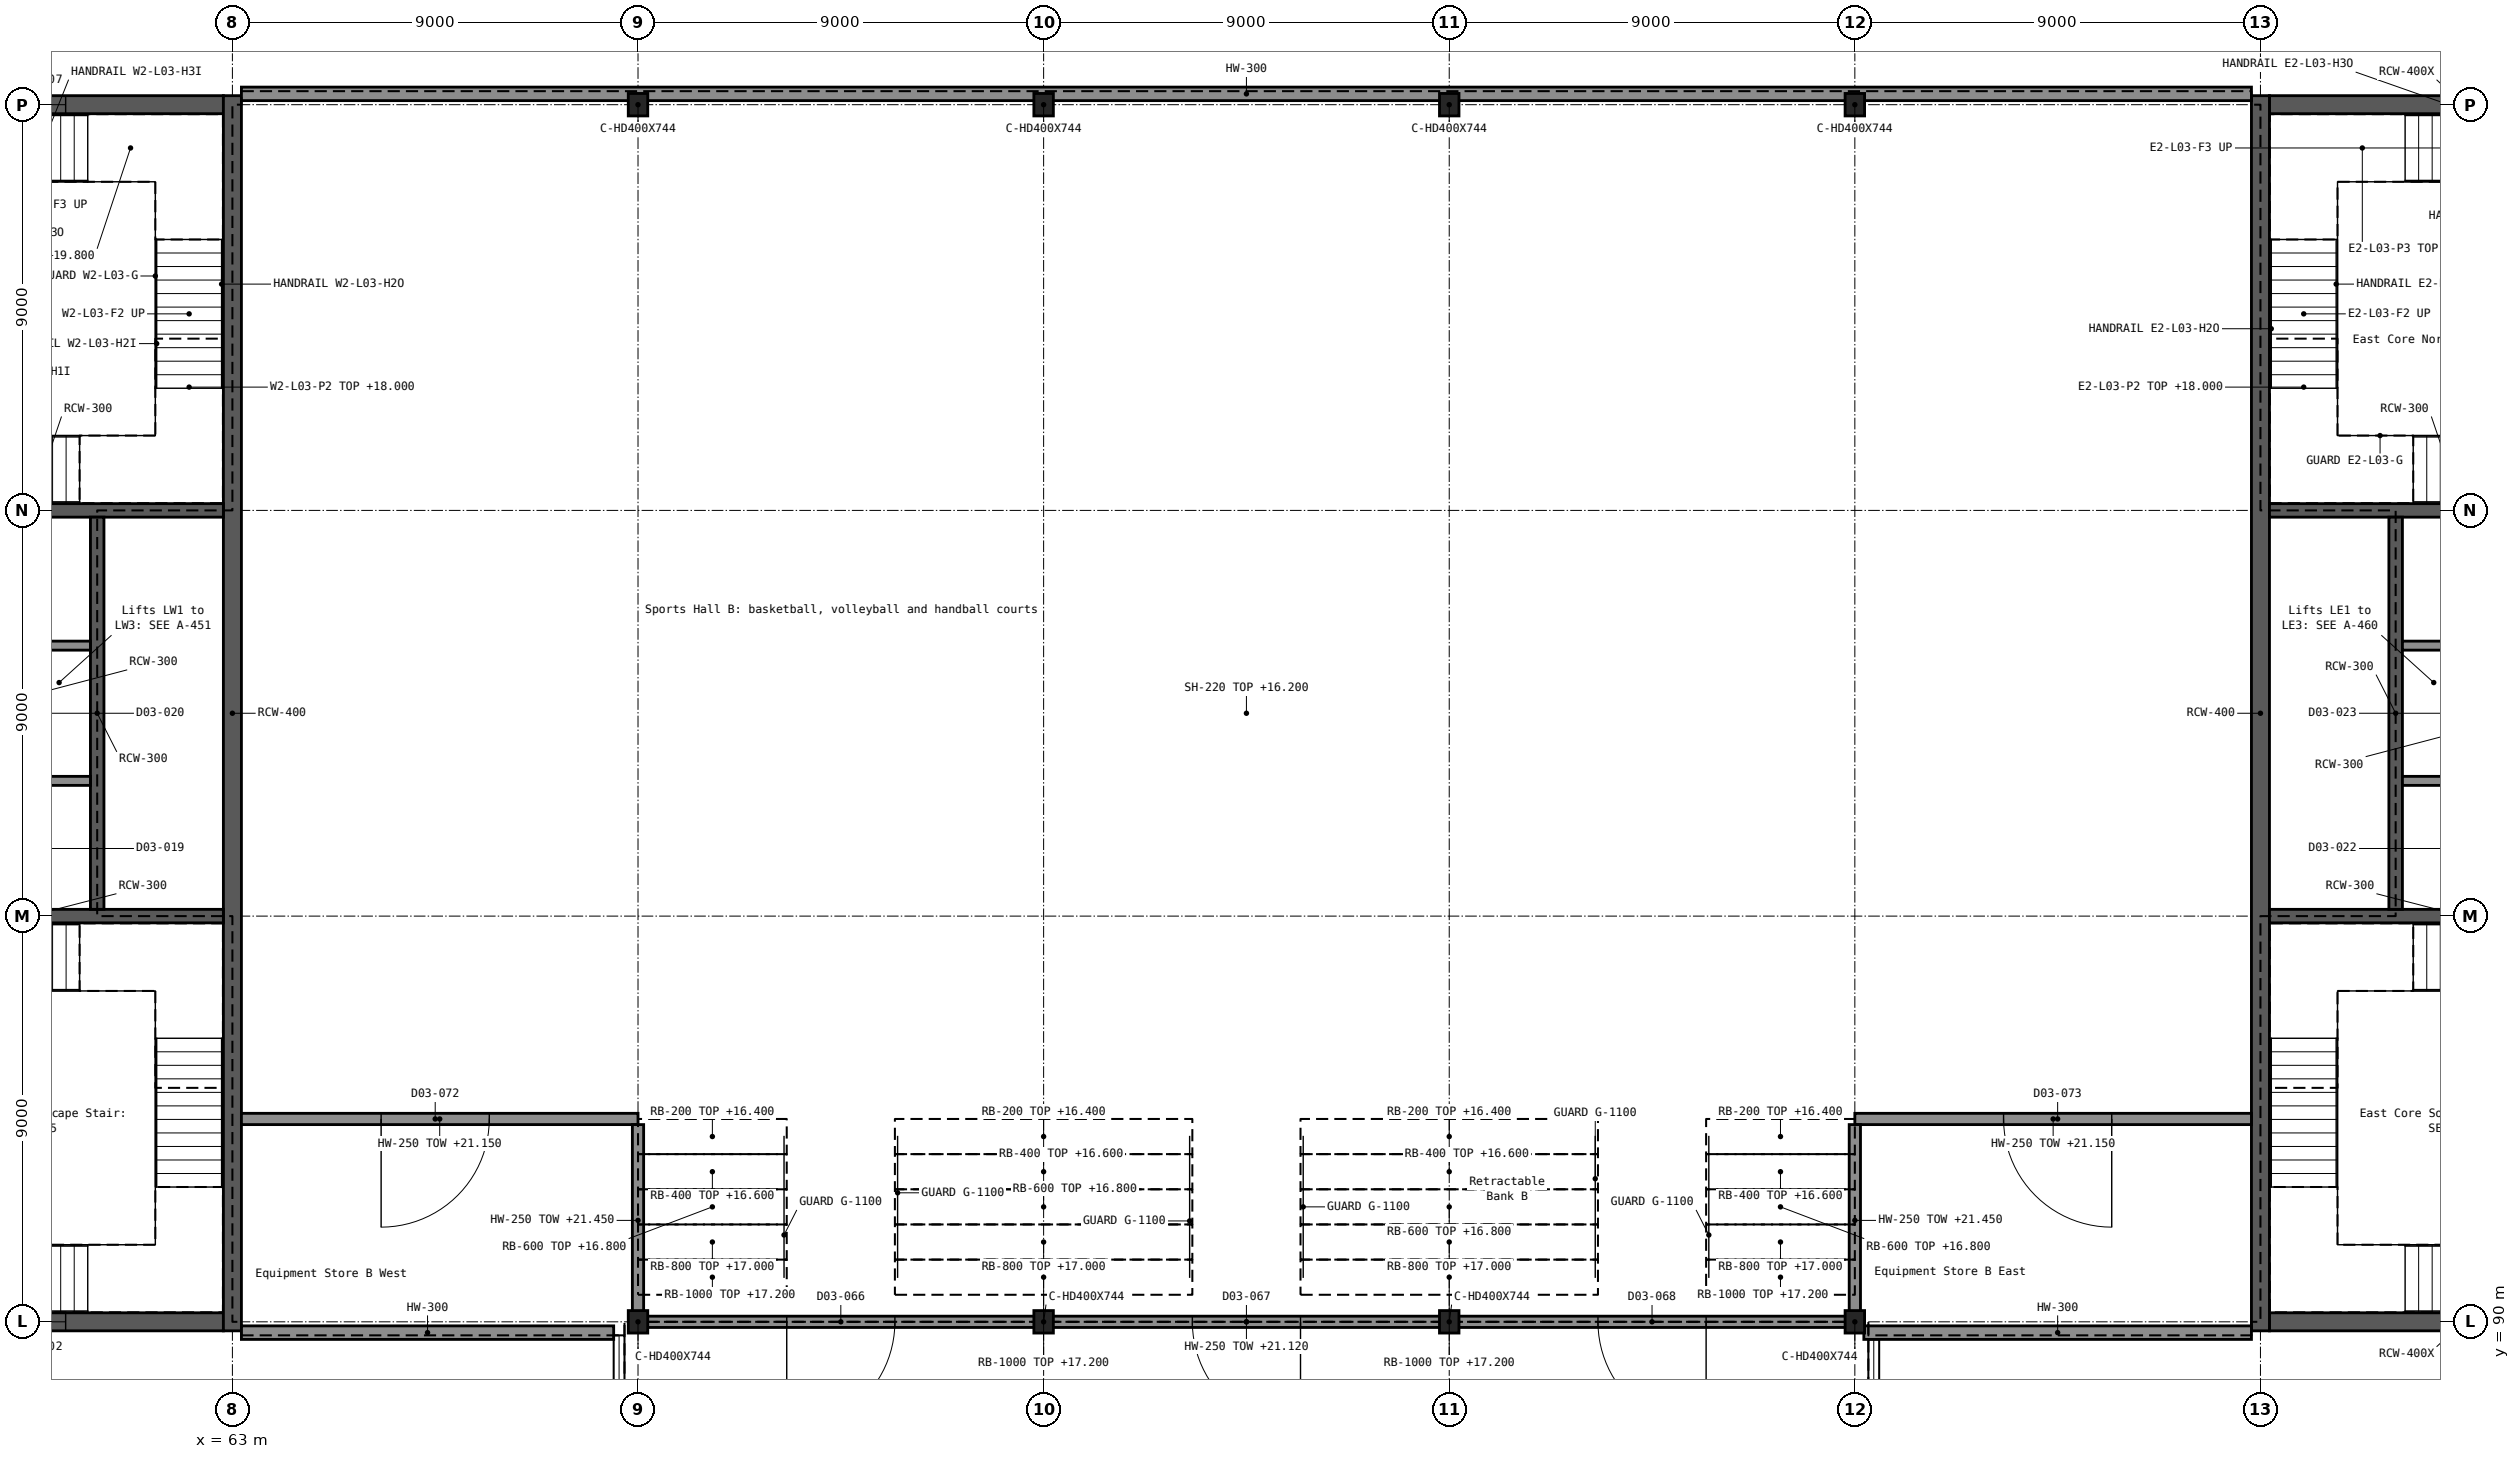
"""IFC4 building model, lengths in metres.
Left out: names, types, materials, properties, quantities, classifications, styles, units other than length and angle.
Written with IfcOpenShell. Run it as: python <this file> out.ifc"""

import sys

from ifc_helpers import new_model, si_unit, direction, frame, frame_2d, origin, origin_2d, place, context, subcontext, project, spatial, rectangle, i_section, extrude, element, fill, save


model = new_model("IFC4")
c1 = context("Model", 3, precision=1e-05, world=origin(), true_north=direction((0.0, 1.0)))
c2 = subcontext(c1, "Body", "Model", "MODEL_VIEW")
j1 = project(units=[si_unit("LENGTHUNIT", "METRE"), si_unit("PLANEANGLEUNIT", "RADIAN")], contexts=[c1])
p1 = place(None, origin())
s1 = spatial("IfcSite", under=j1, at=p1, CompositionType="ELEMENT")
p2 = place(p1, origin())
s2 = spatial("IfcBuilding", under=s1, at=p2, CompositionType="ELEMENT")
p3 = place(p2, frame((0.0, 0.0, 16.2)))
s3 = spatial("IfcBuildingStorey", under=s2, at=p3, CompositionType="ELEMENT", Elevation=16.2)
for number, where, z_axis, x_axis in (
    (1, (72.0, 90.0, 0.0), (0.0, 0.0, 1.0), (1.0, 0.0, 0.0)),
    (2, (81.0, 90.0, 0.0), (0.0, 0.0, 1.0), (1.0, 0.0, 0.0)),
    (3, (90.0, 90.0, 0.0), (0.0, 0.0, 1.0), (1.0, 0.0, 0.0)),
    (4, (99.0, 90.0, 0.0), (0.0, 0.0, 1.0), (1.0, 0.0, 0.0)),
    (5, (72.0, 117.0, 0.0), (0.0, 0.0, 1.0), (1.0, 0.0, 0.0)),
    (6, (81.0, 117.0, 0.0), (0.0, 0.0, 1.0), (1.0, 0.0, 0.0)),
    (7, (90.0, 117.0, 0.0), (0.0, 0.0, 1.0), (1.0, 0.0, 0.0)),
    (8, (99.0, 117.0, 0.0), (0.0, 0.0, 1.0), (1.0, 0.0, 0.0)),
):
    element("IfcColumn", number, at=place(p3, frame(where, z_axis=z_axis, x_axis=x_axis)), inside=s3, PredefinedType="COLUMN", context=c2, shape_type="SweptSolid", body=[
        extrude(i_section(OverallWidth=0.432, OverallDepth=0.498, WebThickness=0.056, FlangeThickness=0.089, FilletRadius=0.015, at=origin_2d()), origin(), (0.0, 0.0, 1.0), 5.4),
    ])
p4 = place(p3, frame((54.2, 90.0, 0.0), z_axis=(0.0, 0.0, 1.0), x_axis=(1.0, 0.0, 0.0)))
e9 = element("IfcWall", 9, at=p4, inside=s3, PredefinedType="SHEAR", context=c2, shape_type="SweptSolid", body=[
    extrude(rectangle(XDim=8.6, YDim=0.4, at=frame_2d((4.3, 0.0))), origin(), (0.0, 0.0, 1.0), 5.4),
])
p5 = place(p4, frame((3.9, 0.0, 1.5)))
e10 = element("IfcOpeningElement", 10, at=p5, cuts=e9, PredefinedType="OPENING", context=c2, shape_type="SweptSolid", body=[
    extrude(rectangle(XDim=1.2, YDim=1.8, at=frame_2d((0.6, 0.9))), frame((0.0, 0.211, 0.0), z_axis=(0.0, -1.0, 0.0), x_axis=(1.0, 0.0, 0.0)), (0.0, 0.0, 1.0), 0.422),
])
p6 = place(p3, frame((54.2, 117.0, 0.0), z_axis=(0.0, 0.0, 1.0), x_axis=(1.0, 0.0, 0.0)))
e11 = element("IfcWall", 11, at=p6, inside=s3, PredefinedType="SHEAR", context=c2, shape_type="SweptSolid", body=[
    extrude(rectangle(XDim=8.6, YDim=0.4, at=frame_2d((4.3, 0.0))), origin(), (0.0, 0.0, 1.0), 5.4),
])
p7 = place(p6, frame((3.9, 0.0, 1.5)))
e12 = element("IfcOpeningElement", 12, at=p7, cuts=e11, PredefinedType="OPENING", context=c2, shape_type="SweptSolid", body=[
    extrude(rectangle(XDim=1.2, YDim=1.8, at=frame_2d((0.6, 0.9))), frame((0.0, 0.211, 0.0), z_axis=(0.0, -1.0, 0.0), x_axis=(1.0, 0.0, 0.0)), (0.0, 0.0, 1.0), 0.422),
])
p8 = place(p3, frame((63.0, 89.8, 0.0), z_axis=(0.0, 0.0, 1.0), x_axis=(0.0, 1.0, 0.0)))
e13 = element("IfcWall", 13, at=p8, inside=s3, PredefinedType="SHEAR", context=c2, shape_type="SweptSolid", body=[
    extrude(rectangle(XDim=27.4, YDim=0.4, at=frame_2d((13.7, 0.0))), origin(), (0.0, 0.0, 1.0), 5.4),
])
for number, where, z_axis, x_axis in (
    (14, (54.2, 99.0, 0.0), (0.0, 0.0, 1.0), (1.0, 0.0, 0.0)),
    (15, (54.2, 108.0, 0.0), (0.0, 0.0, 1.0), (1.0, 0.0, 0.0)),
):
    element("IfcWall", number, at=place(p3, frame(where, z_axis=z_axis, x_axis=x_axis)), inside=s3, PredefinedType="SHEAR", context=c2, shape_type="SweptSolid", body=[
        extrude(rectangle(XDim=8.6, YDim=0.3, at=frame_2d((4.3, 0.0))), origin(), (0.0, 0.0, 1.0), 5.4),
    ])
p9 = place(p3, frame((60.0, 99.15, 0.0), z_axis=(0.0, 0.0, 1.0), x_axis=(0.0, 1.0, 0.0)))
e16 = element("IfcWall", 16, at=p9, inside=s3, PredefinedType="SHEAR", context=c2, shape_type="SweptSolid", body=[
    extrude(rectangle(XDim=8.7, YDim=0.3, at=frame_2d((4.35, 0.0))), origin(), (0.0, 0.0, 1.0), 5.4),
])
p10 = place(p3, frame((108.2, 90.0, 0.0), z_axis=(0.0, 0.0, 1.0), x_axis=(1.0, 0.0, 0.0)))
e17 = element("IfcWall", 17, at=p10, inside=s3, PredefinedType="SHEAR", context=c2, shape_type="SweptSolid", body=[
    extrude(rectangle(XDim=8.6, YDim=0.4, at=frame_2d((4.3, 0.0))), origin(), (0.0, 0.0, 1.0), 5.4),
])
p11 = place(p10, frame((3.9, 0.0, 1.5)))
e18 = element("IfcOpeningElement", 18, at=p11, cuts=e17, PredefinedType="OPENING", context=c2, shape_type="SweptSolid", body=[
    extrude(rectangle(XDim=1.2, YDim=1.8, at=frame_2d((0.6, 0.9))), frame((0.0, 0.211, 0.0), z_axis=(0.0, -1.0, 0.0), x_axis=(1.0, 0.0, 0.0)), (0.0, 0.0, 1.0), 0.422),
])
p12 = place(p3, frame((108.2, 117.0, 0.0), z_axis=(0.0, 0.0, 1.0), x_axis=(1.0, 0.0, 0.0)))
e19 = element("IfcWall", 19, at=p12, inside=s3, PredefinedType="SHEAR", context=c2, shape_type="SweptSolid", body=[
    extrude(rectangle(XDim=8.6, YDim=0.4, at=frame_2d((4.3, 0.0))), origin(), (0.0, 0.0, 1.0), 5.4),
])
p13 = place(p12, frame((3.9, 0.0, 1.5)))
e20 = element("IfcOpeningElement", 20, at=p13, cuts=e19, PredefinedType="OPENING", context=c2, shape_type="SweptSolid", body=[
    extrude(rectangle(XDim=1.2, YDim=1.8, at=frame_2d((0.6, 0.9))), frame((0.0, 0.211, 0.0), z_axis=(0.0, -1.0, 0.0), x_axis=(1.0, 0.0, 0.0)), (0.0, 0.0, 1.0), 0.422),
])
p14 = place(p3, frame((108.0, 89.8, 0.0), z_axis=(0.0, 0.0, 1.0), x_axis=(0.0, 1.0, 0.0)))
e21 = element("IfcWall", 21, at=p14, inside=s3, PredefinedType="SHEAR", context=c2, shape_type="SweptSolid", body=[
    extrude(rectangle(XDim=27.4, YDim=0.4, at=frame_2d((13.7, 0.0))), origin(), (0.0, 0.0, 1.0), 5.4),
])
for number, where, z_axis, x_axis in (
    (22, (108.2, 99.0, 0.0), (0.0, 0.0, 1.0), (1.0, 0.0, 0.0)),
    (23, (108.2, 108.0, 0.0), (0.0, 0.0, 1.0), (1.0, 0.0, 0.0)),
):
    element("IfcWall", number, at=place(p3, frame(where, z_axis=z_axis, x_axis=x_axis)), inside=s3, PredefinedType="SHEAR", context=c2, shape_type="SweptSolid", body=[
        extrude(rectangle(XDim=8.6, YDim=0.3, at=frame_2d((4.3, 0.0))), origin(), (0.0, 0.0, 1.0), 5.4),
    ])
p15 = place(p3, frame((111.0, 99.15, 0.0), z_axis=(0.0, 0.0, 1.0), x_axis=(0.0, 1.0, 0.0)))
e24 = element("IfcWall", 24, at=p15, inside=s3, PredefinedType="SHEAR", context=c2, shape_type="SweptSolid", body=[
    extrude(rectangle(XDim=8.7, YDim=0.3, at=frame_2d((4.35, 0.0))), origin(), (0.0, 0.0, 1.0), 5.4),
])
p16 = place(p3, frame((63.2, 89.76, 0.0), z_axis=(0.0, 0.0, 1.0), x_axis=(1.0, 0.0, 0.0)))
e25 = element("IfcWall", 25, at=p16, inside=s3, PredefinedType="SOLIDWALL", context=c2, shape_type="SweptSolid", body=[
    extrude(rectangle(XDim=8.26, YDim=0.3, at=frame_2d((4.13, 0.0))), origin(), (0.0, 0.0, 1.0), 5.4),
])
p17 = place(p3, frame((99.2, 89.76, 0.0), z_axis=(0.0, 0.0, 1.0), x_axis=(1.0, 0.0, 0.0)))
e26 = element("IfcWall", 26, at=p17, inside=s3, PredefinedType="SOLIDWALL", context=c2, shape_type="SweptSolid", body=[
    extrude(rectangle(XDim=8.6, YDim=0.3, at=frame_2d((4.3, 0.0))), origin(), (0.0, 0.0, 1.0), 5.4),
])
p18 = place(p3, frame((107.8, 117.24, 0.0), z_axis=(0.0, 0.0, 1.0), x_axis=(-1.0, 0.0, 0.0)))
e27 = element("IfcWall", 27, at=p18, inside=s3, PredefinedType="SOLIDWALL", context=c2, shape_type="SweptSolid", body=[
    extrude(rectangle(XDim=44.6, YDim=0.3, at=frame_2d((22.3, 0.0))), origin(), (0.0, 0.0, 1.0), 5.4),
])
for number, where, z_axis, x_axis in (
    (28, (57.15, 102.0, 0.0), (0.0, 0.0, 1.0), (1.0, 0.0, 0.0)),
    (29, (57.15, 105.0, 0.0), (0.0, 0.0, 1.0), (1.0, 0.0, 0.0)),
    (30, (111.15, 102.0, 0.0), (0.0, 0.0, 1.0), (1.0, 0.0, 0.0)),
    (31, (111.15, 105.0, 0.0), (0.0, 0.0, 1.0), (1.0, 0.0, 0.0)),
):
    element("IfcWall", number, at=place(p3, frame(where, z_axis=z_axis, x_axis=x_axis)), inside=s3, PredefinedType="SOLIDWALL", context=c2, shape_type="SweptSolid", body=[
        extrude(rectangle(XDim=2.7, YDim=0.2, at=frame_2d((1.35, 0.0))), origin(), (0.0, 0.0, 1.0), 5.4),
    ])
p19 = place(p3, frame((72.0, 90.0, 0.0), z_axis=(0.0, 0.0, 1.0), x_axis=(1.0, 0.0, 0.0)))
e32 = element("IfcWall", 32, at=p19, inside=s3, PredefinedType="SOLIDWALL", context=c2, shape_type="SweptSolid", body=[
    extrude(rectangle(XDim=27.0, YDim=0.25, at=frame_2d((13.5, 0.0))), origin(), (0.0, 0.0, 1.0), 4.92),
])
p20 = place(p19, frame((3.3, 0.0, 0.0)))
e33 = element("IfcOpeningElement", 33, at=p20, cuts=e32, PredefinedType="OPENING", context=c2, shape_type="SweptSolid", body=[
    extrude(rectangle(XDim=2.4, YDim=2.4, at=frame_2d((1.2, 1.2))), frame((0.0, 0.136, 0.0), z_axis=(0.0, -1.0, 0.0), x_axis=(1.0, 0.0, 0.0)), (0.0, 0.0, 1.0), 0.272),
])
p21 = place(p19, frame((12.3, 0.0, 0.0)))
e34 = element("IfcOpeningElement", 34, at=p21, cuts=e32, PredefinedType="OPENING", context=c2, shape_type="SweptSolid", body=[
    extrude(rectangle(XDim=2.4, YDim=2.4, at=frame_2d((1.2, 1.2))), frame((0.0, 0.136, 0.0), z_axis=(0.0, -1.0, 0.0), x_axis=(1.0, 0.0, 0.0)), (0.0, 0.0, 1.0), 0.272),
])
p22 = place(p19, frame((21.3, 0.0, 0.0)))
e35 = element("IfcOpeningElement", 35, at=p22, cuts=e32, PredefinedType="OPENING", context=c2, shape_type="SweptSolid", body=[
    extrude(rectangle(XDim=2.4, YDim=2.4, at=frame_2d((1.2, 1.2))), frame((0.0, 0.136, 0.0), z_axis=(0.0, -1.0, 0.0), x_axis=(1.0, 0.0, 0.0)), (0.0, 0.0, 1.0), 0.272),
])
p23 = place(p3, frame((63.2, 94.5, 0.0), z_axis=(0.0, 0.0, 1.0), x_axis=(1.0, 0.0, 0.0)))
e36 = element("IfcWall", 36, at=p23, inside=s3, PredefinedType="SOLIDWALL", context=c2, shape_type="SweptSolid", body=[
    extrude(rectangle(XDim=8.8, YDim=0.25, at=frame_2d((4.4, 0.0))), origin(), (0.0, 0.0, 1.0), 4.95),
])
p24 = place(p23, frame((3.1, 0.0, 0.0)))
e37 = element("IfcOpeningElement", 37, at=p24, cuts=e36, PredefinedType="OPENING", context=c2, shape_type="SweptSolid", body=[
    extrude(rectangle(XDim=2.4, YDim=3.0, at=frame_2d((1.2, 1.5))), frame((0.0, 0.136, 0.0), z_axis=(0.0, -1.0, 0.0), x_axis=(1.0, 0.0, 0.0)), (0.0, 0.0, 1.0), 0.272),
])
p25 = place(p3, frame((99.0, 94.5, 0.0), z_axis=(0.0, 0.0, 1.0), x_axis=(1.0, 0.0, 0.0)))
e38 = element("IfcWall", 38, at=p25, inside=s3, PredefinedType="SOLIDWALL", context=c2, shape_type="SweptSolid", body=[
    extrude(rectangle(XDim=8.8, YDim=0.25, at=frame_2d((4.4, 0.0))), origin(), (0.0, 0.0, 1.0), 4.95),
])
p26 = place(p25, frame((3.3, 0.0, 0.0)))
e39 = element("IfcOpeningElement", 39, at=p26, cuts=e38, PredefinedType="OPENING", context=c2, shape_type="SweptSolid", body=[
    extrude(rectangle(XDim=2.4, YDim=3.0, at=frame_2d((1.2, 1.5))), frame((0.0, 0.136, 0.0), z_axis=(0.0, -1.0, 0.0), x_axis=(1.0, 0.0, 0.0)), (0.0, 0.0, 1.0), 0.272),
])
for number, where, z_axis, x_axis in (
    (40, (72.0, 90.125, 0.0), (0.0, 0.0, 1.0), (0.0, 1.0, 0.0)),
    (41, (99.0, 90.125, 0.0), (0.0, 0.0, 1.0), (0.0, 1.0, 0.0)),
):
    element("IfcWall", number, at=place(p3, frame(where, z_axis=z_axis, x_axis=x_axis)), inside=s3, PredefinedType="SOLIDWALL", context=c2, shape_type="SweptSolid", body=[
        extrude(rectangle(XDim=4.25, YDim=0.25, at=frame_2d((2.125, 0.0))), origin(), (0.0, 0.0, 1.0), 5.25),
    ])
p27 = place(p5, origin())
e42 = element("IfcWindow", 42, at=p27, inside=s3, PartitioningType="SINGLE_PANEL", PredefinedType="WINDOW", context=c2, shape_type="SweptSolid", body=[
    extrude(rectangle(XDim=1.2, YDim=1.8, at=frame_2d((0.6, 0.9))), frame((0.0, 0.03, 0.0), z_axis=(0.0, -1.0, 0.0), x_axis=(1.0, 0.0, 0.0)), (0.0, 0.0, 1.0), 0.06),
])
fill(e10, e42)
p28 = place(p7, origin())
e43 = element("IfcWindow", 43, at=p28, inside=s3, PartitioningType="SINGLE_PANEL", PredefinedType="WINDOW", context=c2, shape_type="SweptSolid", body=[
    extrude(rectangle(XDim=1.2, YDim=1.8, at=frame_2d((0.6, 0.9))), frame((0.0, 0.03, 0.0), z_axis=(0.0, -1.0, 0.0), x_axis=(1.0, 0.0, 0.0)), (0.0, 0.0, 1.0), 0.06),
])
fill(e12, e43)
p29 = place(p20, frame((2.4, 0.0, 0.0), z_axis=(0.0, 0.0, 1.0), x_axis=(-1.0, 0.0, 0.0)))
e44 = element("IfcDoor", 44, at=p29, inside=s3, OperationType="DOUBLE_DOOR_SINGLE_SWING", PredefinedType="DOOR", context=c2, shape_type="SweptSolid", body=[
    extrude(rectangle(XDim=2.4, YDim=2.4, at=frame_2d((1.2, 1.2))), frame((0.0, 0.025, 0.0), z_axis=(0.0, -1.0, 0.0), x_axis=(1.0, 0.0, 0.0)), (0.0, 0.0, 1.0), 0.05),
])
fill(e33, e44)
p30 = place(p21, frame((2.4, 0.0, 0.0), z_axis=(0.0, 0.0, 1.0), x_axis=(-1.0, 0.0, 0.0)))
e45 = element("IfcDoor", 45, at=p30, inside=s3, OperationType="DOUBLE_DOOR_SINGLE_SWING", PredefinedType="DOOR", context=c2, shape_type="SweptSolid", body=[
    extrude(rectangle(XDim=2.4, YDim=2.4, at=frame_2d((1.2, 1.2))), frame((0.0, 0.025, 0.0), z_axis=(0.0, -1.0, 0.0), x_axis=(1.0, 0.0, 0.0)), (0.0, 0.0, 1.0), 0.05),
])
fill(e34, e45)
p31 = place(p22, frame((2.4, 0.0, 0.0), z_axis=(0.0, 0.0, 1.0), x_axis=(-1.0, 0.0, 0.0)))
e46 = element("IfcDoor", 46, at=p31, inside=s3, OperationType="DOUBLE_DOOR_SINGLE_SWING", PredefinedType="DOOR", context=c2, shape_type="SweptSolid", body=[
    extrude(rectangle(XDim=2.4, YDim=2.4, at=frame_2d((1.2, 1.2))), frame((0.0, 0.025, 0.0), z_axis=(0.0, -1.0, 0.0), x_axis=(1.0, 0.0, 0.0)), (0.0, 0.0, 1.0), 0.05),
])
fill(e35, e46)
p32 = place(p24, frame((2.4, 0.0, 0.0), z_axis=(0.0, 0.0, 1.0), x_axis=(-1.0, 0.0, 0.0)))
e47 = element("IfcDoor", 47, at=p32, inside=s3, OperationType="DOUBLE_DOOR_SINGLE_SWING", PredefinedType="DOOR", context=c2, shape_type="SweptSolid", body=[
    extrude(rectangle(XDim=2.4, YDim=3.0, at=frame_2d((1.2, 1.5))), frame((0.0, 0.025, 0.0), z_axis=(0.0, -1.0, 0.0), x_axis=(1.0, 0.0, 0.0)), (0.0, 0.0, 1.0), 0.05),
])
fill(e37, e47)
p33 = place(p26, frame((2.4, 0.0, 0.0), z_axis=(0.0, 0.0, 1.0), x_axis=(-1.0, 0.0, 0.0)))
e48 = element("IfcDoor", 48, at=p33, inside=s3, OperationType="DOUBLE_DOOR_SINGLE_SWING", PredefinedType="DOOR", context=c2, shape_type="SweptSolid", body=[
    extrude(rectangle(XDim=2.4, YDim=3.0, at=frame_2d((1.2, 1.5))), frame((0.0, 0.025, 0.0), z_axis=(0.0, -1.0, 0.0), x_axis=(1.0, 0.0, 0.0)), (0.0, 0.0, 1.0), 0.05),
])
fill(e39, e48)
save(model, sys.argv[1])
